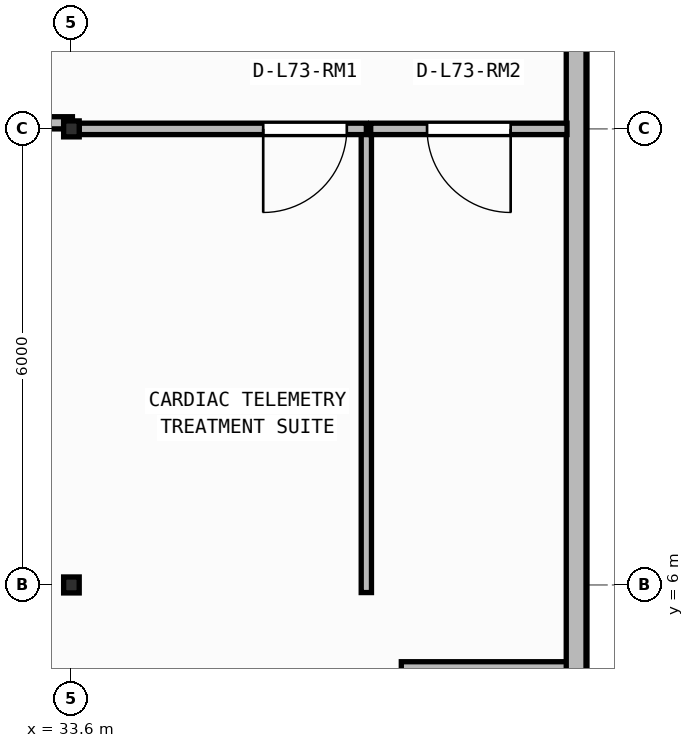
"""IFC4 building model, lengths in metres.
Left out: names, types, materials, properties, quantities, classifications, styles, units other than length and angle.
Written with IfcOpenShell. Run it as: python <this file> out.ifc"""

import sys

from ifc_helpers import new_model, si_unit, direction, frame, frame_2d, origin, origin_2d, place, context, subcontext, project, spatial, rectangle, i_section, extrude, element, fill, save


model = new_model("IFC4")
c1 = context("Model", 3, precision=1e-05, world=origin(), true_north=direction((0.0, 1.0)))
c2 = subcontext(c1, "Body", "Model", "MODEL_VIEW")
j1 = project(units=[si_unit("LENGTHUNIT", "METRE"), si_unit("PLANEANGLEUNIT", "RADIAN")], contexts=[c1])
p1 = place(None, origin())
s1 = spatial("IfcSite", under=j1, at=p1, CompositionType="ELEMENT")
p2 = place(p1, origin())
s2 = spatial("IfcBuilding", under=s1, at=p2, CompositionType="ELEMENT")
p3 = place(p2, frame((0.0, 0.0, 296.05)))
s3 = spatial("IfcBuildingStorey", under=s2, at=p3, CompositionType="ELEMENT", Elevation=296.05)
for number, where, z_axis, x_axis in (
    (1, (33.6, 6.0, 0.0), (0.0, 0.0, 1.0), (1.0, 0.0, 0.0)),
    (2, (33.6, 12.0, 0.0), (0.0, 0.0, 1.0), (1.0, 0.0, 0.0)),
):
    element("IfcColumn", number, at=place(p3, frame(where, z_axis=z_axis, x_axis=x_axis)), inside=s3, PredefinedType="COLUMN", context=c2, shape_type="SweptSolid", body=[
        extrude(i_section(OverallWidth=0.205, OverallDepth=0.21, WebThickness=0.009, FlangeThickness=0.014, FilletRadius=0.011, at=origin_2d()), origin(), (0.0, 0.0, 1.0), 3.95),
    ])
p4 = place(p3, frame((37.94, 4.86, 0.0), z_axis=(0.0, 0.0, 1.0), x_axis=(1.0, 0.0, 0.0)))
e3 = element("IfcWall", 3, at=p4, inside=s3, PredefinedType="STANDARD", context=c2, shape_type="SweptSolid", body=[
    extrude(rectangle(XDim=2.3, YDim=0.26, at=frame_2d((1.15, 0.0))), origin(), (0.0, 0.0, 1.0), 3.71),
])
p5 = place(p3, frame((40.24, 4.86, 0.0), z_axis=(0.0, 0.0, 1.0), x_axis=(0.0, 1.0, 0.0)))
e4 = element("IfcWall", 4, at=p5, inside=s3, PredefinedType="STANDARD", context=c2, shape_type="SweptSolid", body=[
    extrude(rectangle(XDim=20.48, YDim=0.26, at=frame_2d((10.24, 0.0))), origin(), (0.0, 0.0, 1.0), 3.71),
])
p6 = place(p5, frame((11.44, 0.0, 0.0)))
e5 = element("IfcOpeningElement", 5, at=p6, cuts=e4, PredefinedType="OPENING", context=c2, shape_type="SweptSolid", body=[
    extrude(rectangle(XDim=1.3, YDim=2.15, at=frame_2d((0.65, 1.075))), frame((0.0, 0.14, 0.0), z_axis=(0.0, -1.0, 0.0), x_axis=(1.0, 0.0, 0.0)), (0.0, 0.0, 1.0), 0.28),
])
p7 = place(p3, frame((37.48, 5.9, 0.0), z_axis=(0.0, 0.0, 1.0), x_axis=(0.0, 1.0, 0.0)))
e6 = element("IfcWall", 6, at=p7, inside=s3, PredefinedType="PARTITIONING", context=c2, shape_type="SweptSolid", body=[
    extrude(rectangle(XDim=6.1, YDim=0.135, at=frame_2d((3.05, 0.0))), origin(), (0.0, 0.0, 1.0), 3.71),
])
p8 = place(p3, frame((37.48, 12.0, 0.0), z_axis=(0.0, 0.0, 1.0), x_axis=(-1.0, 0.0, 0.0)))
e7 = element("IfcWall", 7, at=p8, inside=s3, PredefinedType="PARTITIONING", context=c2, shape_type="SweptSolid", body=[
    extrude(rectangle(XDim=3.778, YDim=0.15, at=frame_2d((1.889, 0.0))), origin(), (0.0, 0.0, 1.0), 3.71),
])
p9 = place(p8, frame((0.257, 0.0, 0.0)))
e8 = element("IfcOpeningElement", 8, at=p9, cuts=e7, PredefinedType="OPENING", context=c2, shape_type="SweptSolid", body=[
    extrude(rectangle(XDim=1.1, YDim=2.1, at=frame_2d((0.55, 1.05))), frame((0.0, 0.085, 0.0), z_axis=(0.0, -1.0, 0.0), x_axis=(1.0, 0.0, 0.0)), (0.0, 0.0, 1.0), 0.17),
])
p10 = place(p3, frame((40.12, 12.0, 0.0), z_axis=(0.0, 0.0, 1.0), x_axis=(-1.0, 0.0, 0.0)))
e9 = element("IfcWall", 9, at=p10, inside=s3, PredefinedType="PARTITIONING", context=c2, shape_type="SweptSolid", body=[
    extrude(rectangle(XDim=2.583, YDim=0.15, at=frame_2d((1.291, 0.0))), origin(), (0.0, 0.0, 1.0), 3.71),
])
p11 = place(p10, frame((0.741, 0.0, 0.0)))
e10 = element("IfcOpeningElement", 10, at=p11, cuts=e9, PredefinedType="OPENING", context=c2, shape_type="SweptSolid", body=[
    extrude(rectangle(XDim=1.1, YDim=2.1, at=frame_2d((0.55, 1.05))), frame((0.0, 0.085, 0.0), z_axis=(0.0, -1.0, 0.0), x_axis=(1.0, 0.0, 0.0)), (0.0, 0.0, 1.0), 0.17),
])
p12 = place(p3, frame((31.439, 12.08, 0.0), z_axis=(0.0, 0.0, 1.0), x_axis=(1.0, 0.0, 0.0)))
e11 = element("IfcWall", 11, at=p12, inside=s3, PredefinedType="PARTITIONING", context=c2, shape_type="SweptSolid", body=[
    extrude(rectangle(XDim=2.174, YDim=0.16, at=frame_2d((1.087, 0.0))), origin(), (0.0, 0.0, 1.0), 3.157),
])
p13 = place(p9, origin())
e12 = element("IfcDoor", 12, at=p13, inside=s3, OperationType="SINGLE_SWING_RIGHT", PredefinedType="DOOR", context=c2, shape_type="SweptSolid", body=[
    extrude(rectangle(XDim=1.1, YDim=2.1, at=frame_2d((0.55, 1.05))), frame((0.0, 0.025, 0.0), z_axis=(0.0, -1.0, 0.0), x_axis=(1.0, 0.0, 0.0)), (0.0, 0.0, 1.0), 0.05),
])
fill(e8, e12)
p14 = place(p11, origin())
e13 = element("IfcDoor", 13, at=p14, inside=s3, OperationType="SINGLE_SWING_LEFT", PredefinedType="DOOR", context=c2, shape_type="SweptSolid", body=[
    extrude(rectangle(XDim=1.1, YDim=2.1, at=frame_2d((0.55, 1.05))), frame((0.0, 0.025, 0.0), z_axis=(0.0, -1.0, 0.0), x_axis=(1.0, 0.0, 0.0)), (0.0, 0.0, 1.0), 0.05),
])
fill(e10, e13)
save(model, sys.argv[1])
